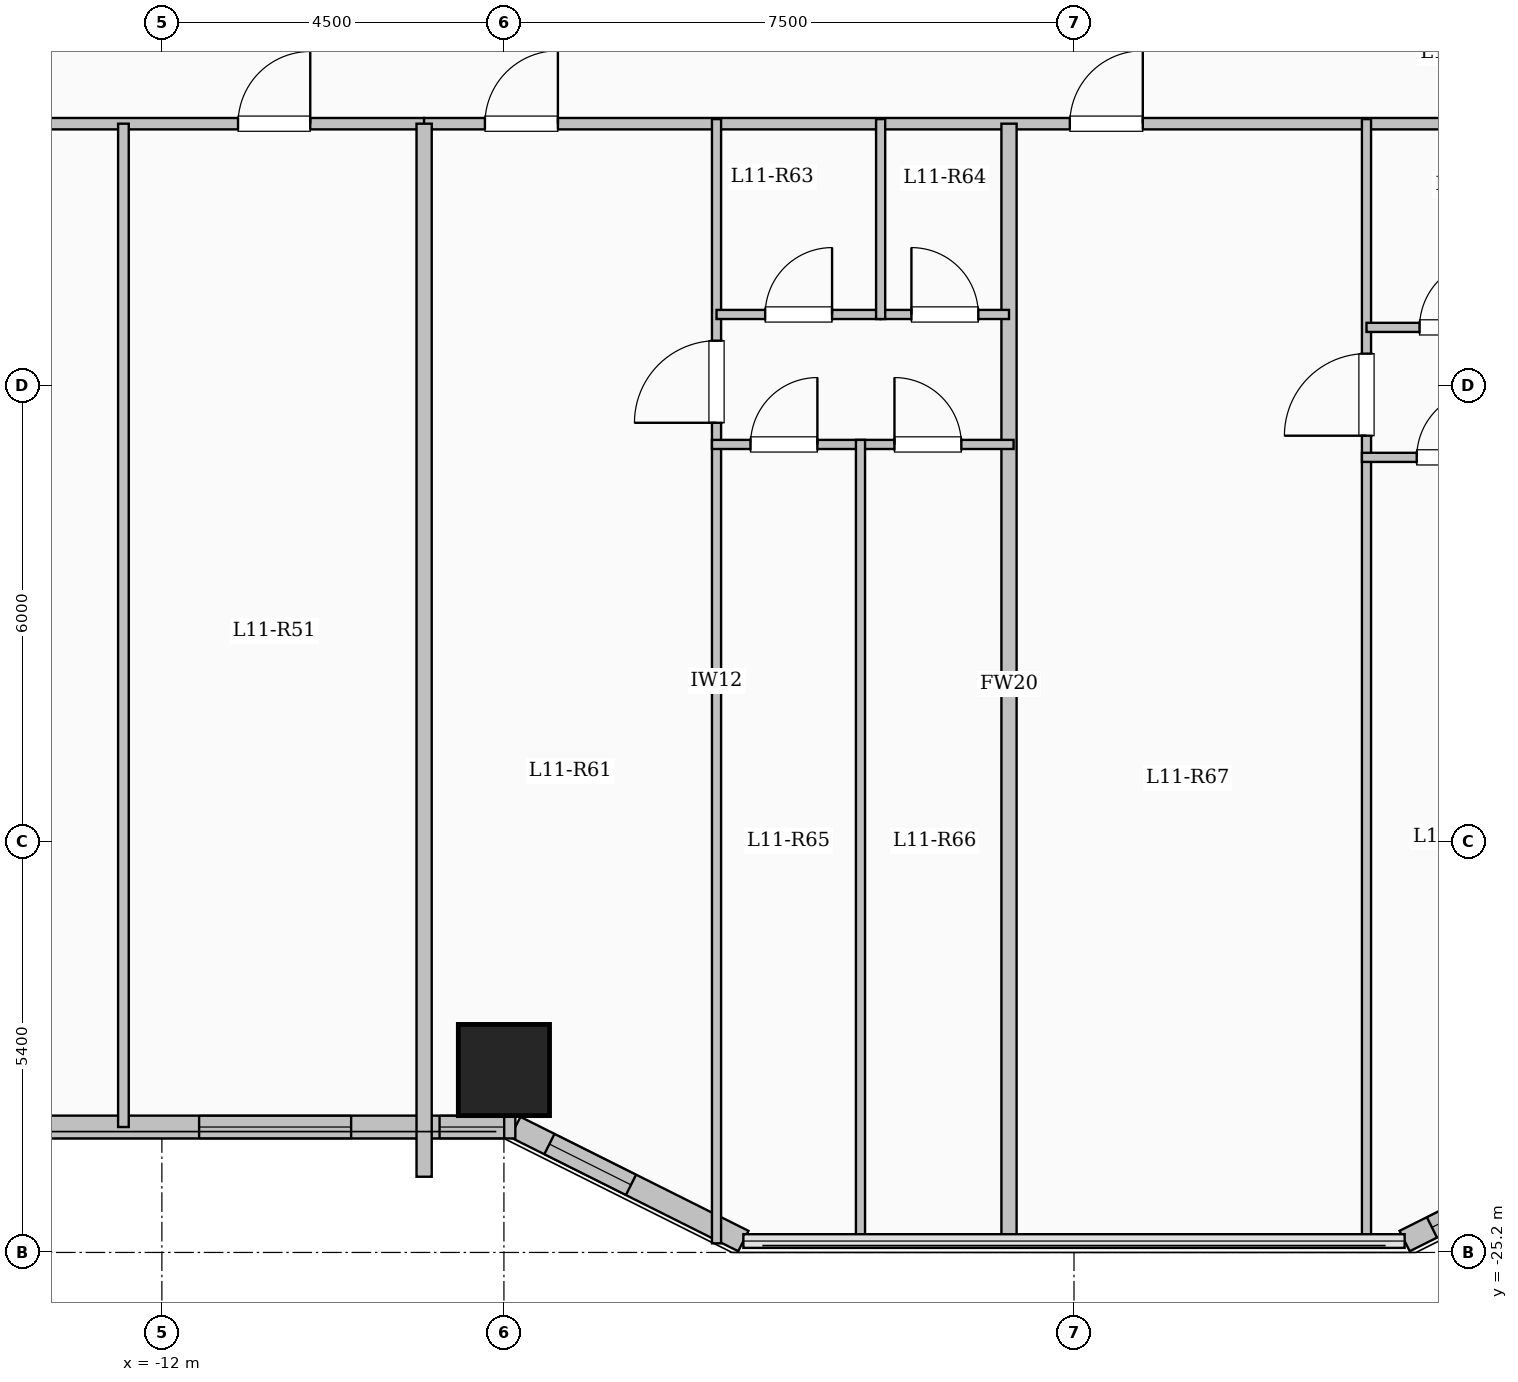
"""IFC4 building model, lengths in metres.
Left out: names, types, materials, properties, quantities, classifications, styles, units other than length and angle.
Written with IfcOpenShell. Run it as: python <this file> out.ifc"""

import sys

from ifc_helpers import new_model, si_unit, direction, frame, frame_2d, origin, origin_2d, place, context, subcontext, project, spatial, rectangle, extrude, element, fill, save


model = new_model("IFC4")
c1 = context("Model", 3, precision=1e-05, world=origin(), true_north=direction((0.0, 1.0)))
c2 = subcontext(c1, "Body", "Model", "MODEL_VIEW")
j1 = project(units=[si_unit("LENGTHUNIT", "METRE"), si_unit("PLANEANGLEUNIT", "RADIAN")], contexts=[c1])
p1 = place(None, origin())
s1 = spatial("IfcSite", under=j1, at=p1, CompositionType="ELEMENT")
p2 = place(p1, origin())
s2 = spatial("IfcBuilding", under=s1, at=p2, CompositionType="ELEMENT")
p3 = place(p2, frame((0.0, 0.0, 44.1)))
s3 = spatial("IfcBuildingStorey", under=s2, at=p3, CompositionType="ELEMENT", Elevation=44.1)
p4 = place(p3, frame((-7.5, -22.8, 0.0), z_axis=(0.0, 0.0, 1.0), x_axis=(1.0, 0.0, 0.0)))
e1 = element("IfcColumn", 1, at=p4, inside=s3, PredefinedType="COLUMN", context=c2, shape_type="SweptSolid", body=[
    extrude(rectangle(XDim=1.2, YDim=1.2, at=origin_2d()), origin(), (0.0, 0.0, 1.0), 3.35),
])
p5 = place(p3, frame((7.35, -23.55, 0.0), z_axis=(0.0, 0.0, 1.0), x_axis=(-0.894427191, -0.4472135955, 0.0)))
e2 = element("IfcWall", 2, at=p5, inside=s3, PredefinedType="SOLIDWALL", context=c2, shape_type="SweptSolid", body=[
    extrude(rectangle(XDim=3.354, YDim=0.3, at=frame_2d((1.677, 0.0))), origin(), (0.0, 0.0, 1.0), 3.1),
])
p6 = place(p5, frame((2.103, 0.0, 0.95)))
e3 = element("IfcOpeningElement", 3, at=p6, cuts=e2, PredefinedType="OPENING", context=c2, shape_type="SweptSolid", body=[
    extrude(rectangle(XDim=0.85, YDim=1.5, at=frame_2d((0.425, 0.75))), frame((0.0, 0.16, 0.0), z_axis=(0.0, -1.0, 0.0), x_axis=(1.0, 0.0, 0.0)), (0.0, 0.0, 1.0), 0.32),
])
p7 = place(p3, frame((-4.35, -25.05, 0.0), z_axis=(0.0, 0.0, 1.0), x_axis=(-0.894427191, 0.4472135955, 0.0)))
e4 = element("IfcWall", 4, at=p7, inside=s3, PredefinedType="SOLIDWALL", context=c2, shape_type="SweptSolid", body=[
    extrude(rectangle(XDim=3.354, YDim=0.3, at=frame_2d((1.677, 0.0))), origin(), (0.0, 0.0, 1.0), 3.1),
])
p8 = place(p7, frame((1.653, 0.0, 0.95)))
e5 = element("IfcOpeningElement", 5, at=p8, cuts=e4, PredefinedType="OPENING", context=c2, shape_type="SweptSolid", body=[
    extrude(rectangle(XDim=1.2, YDim=1.5, at=frame_2d((0.6, 0.75))), frame((0.0, 0.16, 0.0), z_axis=(0.0, -1.0, 0.0), x_axis=(1.0, 0.0, 0.0)), (0.0, 0.0, 1.0), 0.32),
])
p9 = place(p3, frame((-7.35, -23.55, 0.0), z_axis=(0.0, 0.0, 1.0), x_axis=(-1.0, 0.0, 0.0)))
e6 = element("IfcWall", 6, at=p9, inside=s3, PredefinedType="SOLIDWALL", context=c2, shape_type="SweptSolid", body=[
    extrude(rectangle(XDim=15.3, YDim=0.3, at=frame_2d((7.65, 0.0))), origin(), (0.0, 0.0, 1.0), 3.1),
])
p10 = place(p9, frame((0.147, 0.0, 0.95)))
e7 = element("IfcOpeningElement", 7, at=p10, cuts=e6, PredefinedType="OPENING", context=c2, shape_type="SweptSolid", body=[
    extrude(rectangle(XDim=0.85, YDim=1.5, at=frame_2d((0.425, 0.75))), frame((0.0, 0.16, 0.0), z_axis=(0.0, -1.0, 0.0), x_axis=(1.0, 0.0, 0.0)), (0.0, 0.0, 1.0), 0.32),
])
p11 = place(p9, frame((2.16, 0.0, 0.9)))
e8 = element("IfcOpeningElement", 8, at=p11, cuts=e6, PredefinedType="OPENING", context=c2, shape_type="SweptSolid", body=[
    extrude(rectangle(XDim=2.0, YDim=1.7, at=frame_2d((1.0, 0.85))), frame((0.0, 0.16, 0.0), z_axis=(0.0, -1.0, 0.0), x_axis=(1.0, 0.0, 0.0)), (0.0, 0.0, 1.0), 0.32),
])
p12 = place(p9, frame((6.65, 0.0, 0.9)))
e9 = element("IfcOpeningElement", 9, at=p12, cuts=e6, PredefinedType="OPENING", context=c2, shape_type="SweptSolid", body=[
    extrude(rectangle(XDim=2.0, YDim=1.7, at=frame_2d((1.0, 0.85))), frame((0.0, 0.16, 0.0), z_axis=(0.0, -1.0, 0.0), x_axis=(1.0, 0.0, 0.0)), (0.0, 0.0, 1.0), 0.32),
])
p13 = place(p9, frame((11.717, 0.0, 0.9)))
e10 = element("IfcOpeningElement", 10, at=p13, cuts=e6, PredefinedType="OPENING", context=c2, shape_type="SweptSolid", body=[
    extrude(rectangle(XDim=2.0, YDim=1.7, at=frame_2d((1.0, 0.85))), frame((0.0, 0.16, 0.0), z_axis=(0.0, -1.0, 0.0), x_axis=(1.0, 0.0, 0.0)), (0.0, 0.0, 1.0), 0.32),
])
p14 = place(p3, frame((-22.55, -10.35, 0.0), z_axis=(0.0, 0.0, 1.0), x_axis=(1.0, 0.0, 0.0)))
e11 = element("IfcWall", 11, at=p14, inside=s3, PredefinedType="PARTITIONING", context=c2, shape_type="SweptSolid", body=[
    extrude(rectangle(XDim=14.0, YDim=0.15, at=frame_2d((7.0, 0.0))), origin(), (0.0, 0.0, 1.0), 3.1),
])
p15 = place(p14, frame((2.006, 0.0, 0.0)))
e12 = element("IfcOpeningElement", 12, at=p15, cuts=e11, PredefinedType="OPENING", context=c2, shape_type="SweptSolid", body=[
    extrude(rectangle(XDim=0.95, YDim=2.15, at=frame_2d((0.475, 1.075))), frame((0.0, 0.085, 0.0), z_axis=(0.0, -1.0, 0.0), x_axis=(1.0, 0.0, 0.0)), (0.0, 0.0, 1.0), 0.17),
])
p16 = place(p14, frame((7.058, 0.0, 0.0)))
e13 = element("IfcOpeningElement", 13, at=p16, cuts=e11, PredefinedType="OPENING", context=c2, shape_type="SweptSolid", body=[
    extrude(rectangle(XDim=0.95, YDim=2.15, at=frame_2d((0.475, 1.075))), frame((0.0, 0.085, 0.0), z_axis=(0.0, -1.0, 0.0), x_axis=(1.0, 0.0, 0.0)), (0.0, 0.0, 1.0), 0.17),
])
p17 = place(p14, frame((11.552, 0.0, 0.0)))
e14 = element("IfcOpeningElement", 14, at=p17, cuts=e11, PredefinedType="OPENING", context=c2, shape_type="SweptSolid", body=[
    extrude(rectangle(XDim=0.95, YDim=2.15, at=frame_2d((0.475, 1.075))), frame((0.0, 0.085, 0.0), z_axis=(0.0, -1.0, 0.0), x_axis=(1.0, 0.0, 0.0)), (0.0, 0.0, 1.0), 0.17),
])
p18 = place(p3, frame((-8.55, -10.35, 0.0), z_axis=(0.0, 0.0, 1.0), x_axis=(1.0, 0.0, 0.0)))
e15 = element("IfcWall", 15, at=p18, inside=s3, PredefinedType="PARTITIONING", context=c2, shape_type="SweptSolid", body=[
    extrude(rectangle(XDim=17.1, YDim=0.15, at=frame_2d((8.55, 0.0))), origin(), (0.0, 0.0, 1.0), 3.1),
])
p19 = place(p18, frame((0.8, 0.0, 0.0)))
e16 = element("IfcOpeningElement", 16, at=p19, cuts=e15, PredefinedType="OPENING", context=c2, shape_type="SweptSolid", body=[
    extrude(rectangle(XDim=0.96, YDim=2.15, at=frame_2d((0.48, 1.075))), frame((0.0, 0.085, 0.0), z_axis=(0.0, -1.0, 0.0), x_axis=(1.0, 0.0, 0.0)), (0.0, 0.0, 1.0), 0.17),
])
p20 = place(p18, frame((8.495, 0.0, 0.0)))
e17 = element("IfcOpeningElement", 17, at=p20, cuts=e15, PredefinedType="OPENING", context=c2, shape_type="SweptSolid", body=[
    extrude(rectangle(XDim=0.96, YDim=2.15, at=frame_2d((0.48, 1.075))), frame((0.0, 0.085, 0.0), z_axis=(0.0, -1.0, 0.0), x_axis=(1.0, 0.0, 0.0)), (0.0, 0.0, 1.0), 0.17),
])
p21 = place(p3, frame((-12.506, -23.55, 0.0), z_axis=(0.0, 0.0, 1.0), x_axis=(0.0, 1.0, 0.0)))
e18 = element("IfcWall", 18, at=p21, inside=s3, PredefinedType="PARTITIONING", context=c2, shape_type="SweptSolid", body=[
    extrude(rectangle(XDim=13.2, YDim=0.14, at=frame_2d((6.6, 0.0))), origin(), (0.0, 0.0, 1.0), 3.1),
])
p22 = place(p3, frame((-8.55, -24.204, 0.0), z_axis=(0.0, 0.0, 1.0), x_axis=(0.0, 1.0, 0.0)))
e19 = element("IfcWall", 19, at=p22, inside=s3, PredefinedType="SOLIDWALL", context=c2, shape_type="SweptSolid", body=[
    extrude(rectangle(XDim=13.854, YDim=0.2, at=frame_2d((6.927, 0.0))), origin(), (0.0, 0.0, 1.0), 3.1),
])
p23 = place(p3, frame((-0.855, -25.08, 0.0), z_axis=(0.0, 0.0, 1.0), x_axis=(0.0, 1.0, 0.0)))
e20 = element("IfcWall", 20, at=p23, inside=s3, PredefinedType="SOLIDWALL", context=c2, shape_type="SweptSolid", body=[
    extrude(rectangle(XDim=14.73, YDim=0.2, at=frame_2d((7.365, 0.0))), origin(), (0.0, 0.0, 1.0), 3.1),
])
p24 = place(p3, frame((-4.703, -25.08, 0.0), z_axis=(0.0, 0.0, 1.0), x_axis=(0.0, 1.0, 0.0)))
e21 = element("IfcWall", 21, at=p24, inside=s3, PredefinedType="PARTITIONING", context=c2, shape_type="SweptSolid", body=[
    extrude(rectangle(XDim=14.79, YDim=0.12, at=frame_2d((7.395, 0.0))), origin(), (0.0, 0.0, 1.0), 3.1),
])
p25 = place(p24, frame((10.795, 0.0, 0.0)))
e22 = element("IfcOpeningElement", 22, at=p25, cuts=e21, PredefinedType="OPENING", context=c2, shape_type="SweptSolid", body=[
    extrude(rectangle(XDim=1.08, YDim=2.15, at=frame_2d((0.54, 1.075))), frame((0.0, 0.07, 0.0), z_axis=(0.0, -1.0, 0.0), x_axis=(1.0, 0.0, 0.0)), (0.0, 0.0, 1.0), 0.14),
])
p26 = place(p3, frame((-4.703, -12.86, 0.0), z_axis=(0.0, 0.0, 1.0), x_axis=(1.0, 0.0, 0.0)))
e23 = element("IfcWall", 23, at=p26, inside=s3, PredefinedType="PARTITIONING", context=c2, shape_type="SweptSolid", body=[
    extrude(rectangle(XDim=2.159, YDim=0.12, at=frame_2d((1.08, 0.0))), origin(), (0.0, 0.0, 1.0), 2.585),
])
p27 = place(p26, frame((0.64, 0.0, 0.0)))
e24 = element("IfcOpeningElement", 24, at=p27, cuts=e23, PredefinedType="OPENING", context=c2, shape_type="SweptSolid", body=[
    extrude(rectangle(XDim=0.88, YDim=2.1, at=frame_2d((0.44, 1.05))), frame((0.0, 0.07, 0.0), z_axis=(0.0, -1.0, 0.0), x_axis=(1.0, 0.0, 0.0)), (0.0, 0.0, 1.0), 0.14),
])
p28 = place(p3, frame((-2.544, -12.86, 0.0), z_axis=(0.0, 0.0, 1.0), x_axis=(1.0, 0.0, 0.0)))
e25 = element("IfcWall", 25, at=p28, inside=s3, PredefinedType="PARTITIONING", context=c2, shape_type="SweptSolid", body=[
    extrude(rectangle(XDim=1.689, YDim=0.12, at=frame_2d((0.844, 0.0))), origin(), (0.0, 0.0, 1.0), 2.585),
])
p29 = place(p28, frame((0.405, 0.0, 0.0)))
e26 = element("IfcOpeningElement", 26, at=p29, cuts=e25, PredefinedType="OPENING", context=c2, shape_type="SweptSolid", body=[
    extrude(rectangle(XDim=0.88, YDim=2.1, at=frame_2d((0.44, 1.05))), frame((0.0, 0.07, 0.0), z_axis=(0.0, -1.0, 0.0), x_axis=(1.0, 0.0, 0.0)), (0.0, 0.0, 1.0), 0.14),
])
p30 = place(p3, frame((-4.763, -14.57, 0.0), z_axis=(0.0, 0.0, 1.0), x_axis=(1.0, 0.0, 0.0)))
e27 = element("IfcWall", 27, at=p30, inside=s3, PredefinedType="PARTITIONING", context=c2, shape_type="SweptSolid", body=[
    extrude(rectangle(XDim=3.968, YDim=0.12, at=frame_2d((1.984, 0.0))), origin(), (0.0, 0.0, 1.0), 3.1),
])
p31 = place(p30, frame((0.507, 0.0, 0.0)))
e28 = element("IfcOpeningElement", 28, at=p31, cuts=e27, PredefinedType="OPENING", context=c2, shape_type="SweptSolid", body=[
    extrude(rectangle(XDim=0.88, YDim=2.1, at=frame_2d((0.44, 1.05))), frame((0.0, 0.07, 0.0), z_axis=(0.0, -1.0, 0.0), x_axis=(1.0, 0.0, 0.0)), (0.0, 0.0, 1.0), 0.14),
])
p32 = place(p30, frame((2.401, 0.0, 0.0)))
e29 = element("IfcOpeningElement", 29, at=p32, cuts=e27, PredefinedType="OPENING", context=c2, shape_type="SweptSolid", body=[
    extrude(rectangle(XDim=0.88, YDim=2.1, at=frame_2d((0.44, 1.05))), frame((0.0, 0.07, 0.0), z_axis=(0.0, -1.0, 0.0), x_axis=(1.0, 0.0, 0.0)), (0.0, 0.0, 1.0), 0.14),
])
p33 = place(p3, frame((-2.544, -12.92, 0.0), z_axis=(0.0, 0.0, 1.0), x_axis=(0.0, 1.0, 0.0)))
e30 = element("IfcWall", 30, at=p33, inside=s3, PredefinedType="PARTITIONING", context=c2, shape_type="SweptSolid", body=[
    extrude(rectangle(XDim=2.63, YDim=0.12, at=frame_2d((1.315, 0.0))), origin(), (0.0, 0.0, 1.0), 3.1),
])
p34 = place(p3, frame((-2.809, -25.08, 0.0), z_axis=(0.0, 0.0, 1.0), x_axis=(0.0, 1.0, 0.0)))
e31 = element("IfcWall", 31, at=p34, inside=s3, PredefinedType="PARTITIONING", context=c2, shape_type="SweptSolid", body=[
    extrude(rectangle(XDim=10.57, YDim=0.12, at=frame_2d((5.285, 0.0))), origin(), (0.0, 0.0, 1.0), 3.1),
])
p35 = place(p3, frame((3.848, -25.08, 0.0), z_axis=(0.0, 0.0, 1.0), x_axis=(0.0, 1.0, 0.0)))
e32 = element("IfcWall", 32, at=p35, inside=s3, PredefinedType="PARTITIONING", context=c2, shape_type="SweptSolid", body=[
    extrude(rectangle(XDim=14.79, YDim=0.12, at=frame_2d((7.395, 0.0))), origin(), (0.0, 0.0, 1.0), 3.1),
])
p36 = place(p35, frame((10.625, 0.0, 0.0)))
e33 = element("IfcOpeningElement", 33, at=p36, cuts=e32, PredefinedType="OPENING", context=c2, shape_type="SweptSolid", body=[
    extrude(rectangle(XDim=1.08, YDim=2.15, at=frame_2d((0.54, 1.075))), frame((0.0, 0.07, 0.0), z_axis=(0.0, -1.0, 0.0), x_axis=(1.0, 0.0, 0.0)), (0.0, 0.0, 1.0), 0.14),
])
p37 = place(p3, frame((3.848, -13.03, 0.0), z_axis=(0.0, 0.0, 1.0), x_axis=(1.0, 0.0, 0.0)))
e34 = element("IfcWall", 34, at=p37, inside=s3, PredefinedType="PARTITIONING", context=c2, shape_type="SweptSolid", body=[
    extrude(rectangle(XDim=2.275, YDim=0.12, at=frame_2d((1.138, 0.0))), origin(), (0.0, 0.0, 1.0), 2.585),
])
p38 = place(p37, frame((0.698, 0.0, 0.0)))
e35 = element("IfcOpeningElement", 35, at=p38, cuts=e34, PredefinedType="OPENING", context=c2, shape_type="SweptSolid", body=[
    extrude(rectangle(XDim=0.88, YDim=2.1, at=frame_2d((0.44, 1.05))), frame((0.0, 0.07, 0.0), z_axis=(0.0, -1.0, 0.0), x_axis=(1.0, 0.0, 0.0)), (0.0, 0.0, 1.0), 0.14),
])
p39 = place(p3, frame((3.788, -14.74, 0.0), z_axis=(0.0, 0.0, 1.0), x_axis=(1.0, 0.0, 0.0)))
e36 = element("IfcWall", 36, at=p39, inside=s3, PredefinedType="PARTITIONING", context=c2, shape_type="SweptSolid", body=[
    extrude(rectangle(XDim=4.822, YDim=0.12, at=frame_2d((2.411, 0.0))), origin(), (0.0, 0.0, 1.0), 2.585),
])
p40 = place(p39, frame((0.721, 0.0, 0.0)))
e37 = element("IfcOpeningElement", 37, at=p40, cuts=e36, PredefinedType="OPENING", context=c2, shape_type="SweptSolid", body=[
    extrude(rectangle(XDim=0.88, YDim=2.1, at=frame_2d((0.44, 1.05))), frame((0.0, 0.07, 0.0), z_axis=(0.0, -1.0, 0.0), x_axis=(1.0, 0.0, 0.0)), (0.0, 0.0, 1.0), 0.14),
])
p41 = place(p39, frame((3.042, 0.0, 0.0)))
e38 = element("IfcOpeningElement", 38, at=p41, cuts=e36, PredefinedType="OPENING", context=c2, shape_type="SweptSolid", body=[
    extrude(rectangle(XDim=0.88, YDim=2.1, at=frame_2d((0.44, 1.05))), frame((0.0, 0.07, 0.0), z_axis=(0.0, -1.0, 0.0), x_axis=(1.0, 0.0, 0.0)), (0.0, 0.0, 1.0), 0.14),
])
p42 = place(p6, origin())
e39 = element("IfcWindow", 39, at=p42, inside=s3, PartitioningType="SINGLE_PANEL", PredefinedType="WINDOW", context=c2, shape_type="SweptSolid", body=[
    extrude(rectangle(XDim=0.85, YDim=1.5, at=frame_2d((0.425, 0.75))), frame((0.0, 0.03, 0.0), z_axis=(0.0, -1.0, 0.0), x_axis=(1.0, 0.0, 0.0)), (0.0, 0.0, 1.0), 0.06),
])
fill(e3, e39)
p43 = place(p8, origin())
e40 = element("IfcWindow", 40, at=p43, inside=s3, PartitioningType="SINGLE_PANEL", PredefinedType="WINDOW", context=c2, shape_type="SweptSolid", body=[
    extrude(rectangle(XDim=1.2, YDim=1.5, at=frame_2d((0.6, 0.75))), frame((0.0, 0.03, 0.0), z_axis=(0.0, -1.0, 0.0), x_axis=(1.0, 0.0, 0.0)), (0.0, 0.0, 1.0), 0.06),
])
fill(e5, e40)
p44 = place(p10, origin())
e41 = element("IfcWindow", 41, at=p44, inside=s3, PartitioningType="SINGLE_PANEL", PredefinedType="WINDOW", context=c2, shape_type="SweptSolid", body=[
    extrude(rectangle(XDim=0.85, YDim=1.5, at=frame_2d((0.425, 0.75))), frame((0.0, 0.03, 0.0), z_axis=(0.0, -1.0, 0.0), x_axis=(1.0, 0.0, 0.0)), (0.0, 0.0, 1.0), 0.06),
])
fill(e7, e41)
p45 = place(p11, origin())
e42 = element("IfcWindow", 42, at=p45, inside=s3, PartitioningType="SINGLE_PANEL", PredefinedType="WINDOW", context=c2, shape_type="SweptSolid", body=[
    extrude(rectangle(XDim=2.0, YDim=1.7, at=frame_2d((1.0, 0.85))), frame((0.0, 0.03, 0.0), z_axis=(0.0, -1.0, 0.0), x_axis=(1.0, 0.0, 0.0)), (0.0, 0.0, 1.0), 0.06),
])
fill(e8, e42)
p46 = place(p17, origin())
e43 = element("IfcDoor", 43, at=p46, inside=s3, OperationType="SINGLE_SWING_RIGHT", PredefinedType="DOOR", context=c2, shape_type="SweptSolid", body=[
    extrude(rectangle(XDim=0.95, YDim=2.15, at=frame_2d((0.475, 1.075))), frame((0.0, 0.025, 0.0), z_axis=(0.0, -1.0, 0.0), x_axis=(1.0, 0.0, 0.0)), (0.0, 0.0, 1.0), 0.05),
])
fill(e14, e43)
p47 = place(p19, origin())
e44 = element("IfcDoor", 44, at=p47, inside=s3, OperationType="SINGLE_SWING_RIGHT", PredefinedType="DOOR", context=c2, shape_type="SweptSolid", body=[
    extrude(rectangle(XDim=0.96, YDim=2.15, at=frame_2d((0.48, 1.075))), frame((0.0, 0.025, 0.0), z_axis=(0.0, -1.0, 0.0), x_axis=(1.0, 0.0, 0.0)), (0.0, 0.0, 1.0), 0.05),
])
fill(e16, e44)
p48 = place(p25, origin())
e45 = element("IfcDoor", 45, at=p48, inside=s3, OperationType="SINGLE_SWING_LEFT", PredefinedType="DOOR", context=c2, shape_type="SweptSolid", body=[
    extrude(rectangle(XDim=1.08, YDim=2.15, at=frame_2d((0.54, 1.075))), frame((0.0, 0.025, 0.0), z_axis=(0.0, -1.0, 0.0), x_axis=(1.0, 0.0, 0.0)), (0.0, 0.0, 1.0), 0.05),
])
fill(e22, e45)
p49 = place(p27, origin())
e46 = element("IfcDoor", 46, at=p49, inside=s3, OperationType="SINGLE_SWING_RIGHT", PredefinedType="DOOR", context=c2, shape_type="SweptSolid", body=[
    extrude(rectangle(XDim=0.88, YDim=2.1, at=frame_2d((0.44, 1.05))), frame((0.0, 0.025, 0.0), z_axis=(0.0, -1.0, 0.0), x_axis=(1.0, 0.0, 0.0)), (0.0, 0.0, 1.0), 0.05),
])
fill(e24, e46)
p50 = place(p29, origin())
e47 = element("IfcDoor", 47, at=p50, inside=s3, OperationType="SINGLE_SWING_LEFT", PredefinedType="DOOR", context=c2, shape_type="SweptSolid", body=[
    extrude(rectangle(XDim=0.88, YDim=2.1, at=frame_2d((0.44, 1.05))), frame((0.0, 0.025, 0.0), z_axis=(0.0, -1.0, 0.0), x_axis=(1.0, 0.0, 0.0)), (0.0, 0.0, 1.0), 0.05),
])
fill(e26, e47)
p51 = place(p31, origin())
e48 = element("IfcDoor", 48, at=p51, inside=s3, OperationType="SINGLE_SWING_RIGHT", PredefinedType="DOOR", context=c2, shape_type="SweptSolid", body=[
    extrude(rectangle(XDim=0.88, YDim=2.1, at=frame_2d((0.44, 1.05))), frame((0.0, 0.025, 0.0), z_axis=(0.0, -1.0, 0.0), x_axis=(1.0, 0.0, 0.0)), (0.0, 0.0, 1.0), 0.05),
])
fill(e28, e48)
p52 = place(p32, origin())
e49 = element("IfcDoor", 49, at=p52, inside=s3, OperationType="SINGLE_SWING_LEFT", PredefinedType="DOOR", context=c2, shape_type="SweptSolid", body=[
    extrude(rectangle(XDim=0.88, YDim=2.1, at=frame_2d((0.44, 1.05))), frame((0.0, 0.025, 0.0), z_axis=(0.0, -1.0, 0.0), x_axis=(1.0, 0.0, 0.0)), (0.0, 0.0, 1.0), 0.05),
])
fill(e29, e49)
p53 = place(p20, origin())
e50 = element("IfcDoor", 50, at=p53, inside=s3, OperationType="SINGLE_SWING_RIGHT", PredefinedType="DOOR", context=c2, shape_type="SweptSolid", body=[
    extrude(rectangle(XDim=0.96, YDim=2.15, at=frame_2d((0.48, 1.075))), frame((0.0, 0.025, 0.0), z_axis=(0.0, -1.0, 0.0), x_axis=(1.0, 0.0, 0.0)), (0.0, 0.0, 1.0), 0.05),
])
fill(e17, e50)
p54 = place(p36, origin())
e51 = element("IfcDoor", 51, at=p54, inside=s3, OperationType="SINGLE_SWING_LEFT", PredefinedType="DOOR", context=c2, shape_type="SweptSolid", body=[
    extrude(rectangle(XDim=1.08, YDim=2.15, at=frame_2d((0.54, 1.075))), frame((0.0, 0.025, 0.0), z_axis=(0.0, -1.0, 0.0), x_axis=(1.0, 0.0, 0.0)), (0.0, 0.0, 1.0), 0.05),
])
fill(e33, e51)
p55 = place(p38, origin())
e52 = element("IfcDoor", 52, at=p55, inside=s3, OperationType="SINGLE_SWING_RIGHT", PredefinedType="DOOR", context=c2, shape_type="SweptSolid", body=[
    extrude(rectangle(XDim=0.88, YDim=2.1, at=frame_2d((0.44, 1.05))), frame((0.0, 0.025, 0.0), z_axis=(0.0, -1.0, 0.0), x_axis=(1.0, 0.0, 0.0)), (0.0, 0.0, 1.0), 0.05),
])
fill(e35, e52)
p56 = place(p40, origin())
e53 = element("IfcDoor", 53, at=p56, inside=s3, OperationType="SINGLE_SWING_RIGHT", PredefinedType="DOOR", context=c2, shape_type="SweptSolid", body=[
    extrude(rectangle(XDim=0.88, YDim=2.1, at=frame_2d((0.44, 1.05))), frame((0.0, 0.025, 0.0), z_axis=(0.0, -1.0, 0.0), x_axis=(1.0, 0.0, 0.0)), (0.0, 0.0, 1.0), 0.05),
])
fill(e37, e53)
save(model, sys.argv[1])
